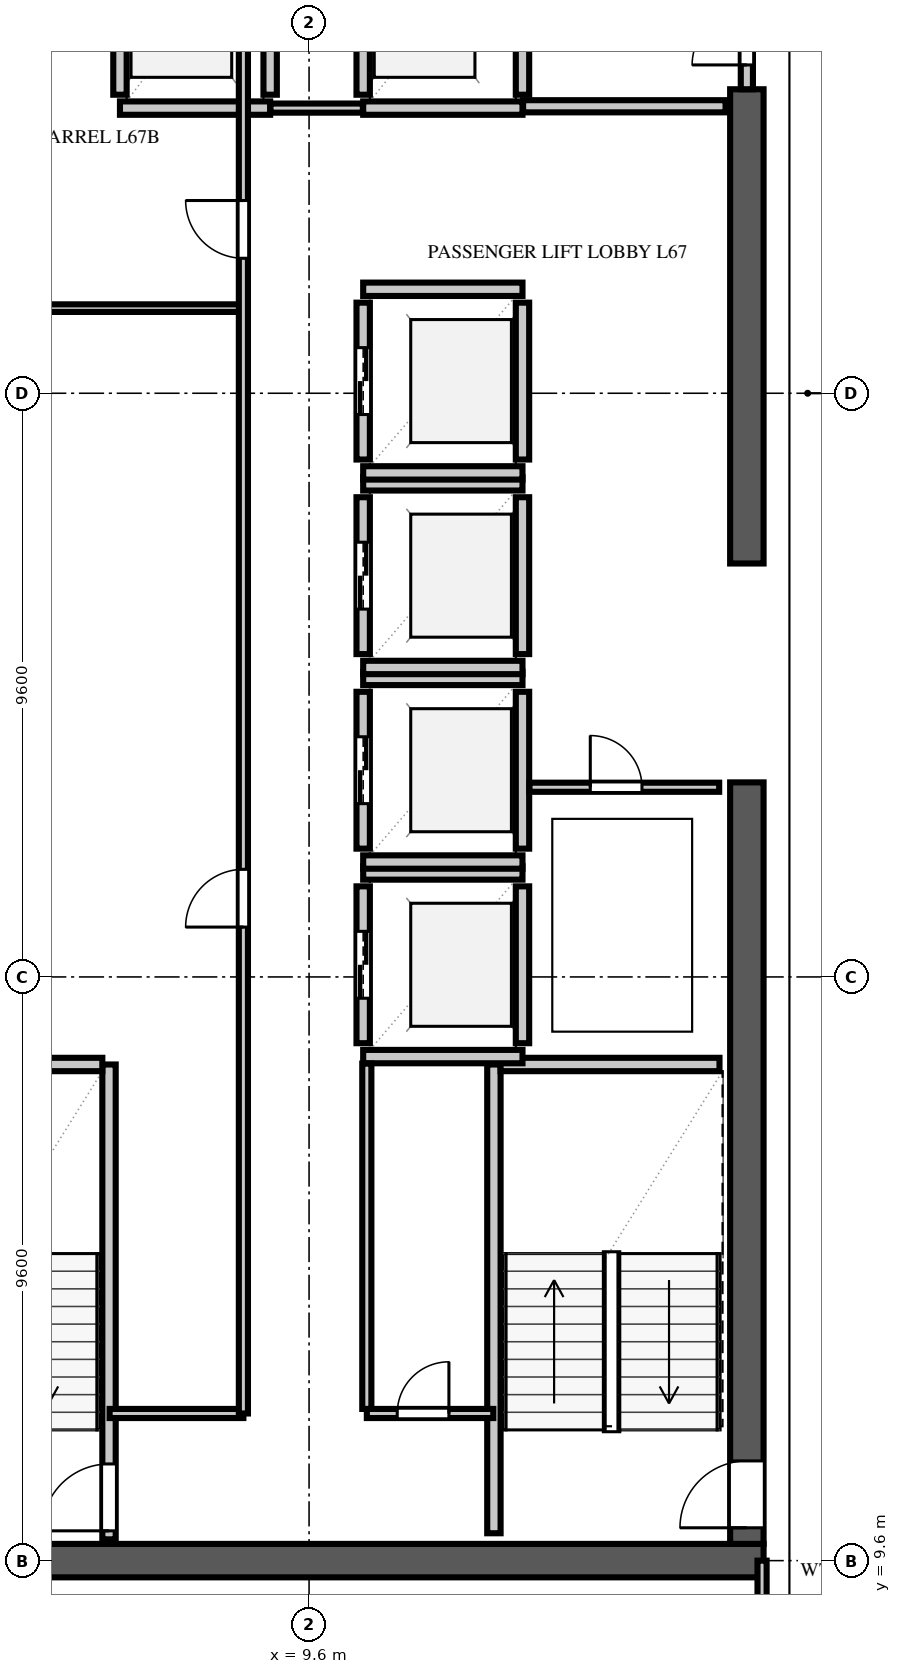
"""IFC4 building model, lengths in metres.
Left out: names, types, materials, properties, quantities, classifications, styles, units other than length and angle.
Written with IfcOpenShell. Run it as: python <this file> out.ifc"""

import sys

from ifc_helpers import new_model, si_unit, direction, frame, frame_2d, origin, place, context, subcontext, project, spatial, rectangle, extrude, element, fill, save


model = new_model("IFC4")
c1 = context("Model", 3, precision=1e-05, world=origin(), true_north=direction((0.0, 1.0)))
c2 = subcontext(c1, "Body", "Model", "MODEL_VIEW")
j1 = project(units=[si_unit("LENGTHUNIT", "METRE"), si_unit("PLANEANGLEUNIT", "RADIAN")], contexts=[c1])
p1 = place(None, origin())
s1 = spatial("IfcSite", under=j1, at=p1, CompositionType="ELEMENT")
p2 = place(p1, origin())
s2 = spatial("IfcBuilding", under=s1, at=p2, CompositionType="ELEMENT")
p3 = place(p2, frame((0.0, 0.0, 265.8)))
s3 = spatial("IfcBuildingStorey", under=s2, at=p3, CompositionType="ELEMENT", Elevation=265.8)
p4 = place(p3, frame((2.475, 9.6, 0.0), z_axis=(0.0, 0.0, 1.0), x_axis=(1.0, 0.0, 0.0)))
e1 = element("IfcWall", 1, at=p4, inside=s3, PredefinedType="SHEAR", context=c2, shape_type="SweptSolid", body=[
    extrude(rectangle(XDim=14.6, YDim=0.55, at=frame_2d((7.3, 0.0))), origin(), (0.0, 0.0, 1.0), 3.54),
])
p5 = place(p3, frame((16.8, 9.875, 0.0), z_axis=(0.0, 0.0, 1.0), x_axis=(0.0, 1.0, 0.0)))
e2 = element("IfcWall", 2, at=p5, inside=s3, PredefinedType="SHEAR", context=c2, shape_type="SweptSolid", body=[
    extrude(rectangle(XDim=12.525, YDim=0.55, at=frame_2d((6.262, 0.0))), origin(), (0.0, 0.0, 1.0), 3.54),
])
p6 = place(p5, frame((0.265, 0.0, 0.0)))
e3 = element("IfcOpeningElement", 3, at=p6, cuts=e2, PredefinedType="OPENING", context=c2, shape_type="SweptSolid", body=[
    extrude(rectangle(XDim=1.1, YDim=2.2, at=frame_2d((0.55, 1.1))), frame((0.0, 0.287, 0.0), z_axis=(0.0, -1.0, 0.0), x_axis=(1.0, 0.0, 0.0)), (0.0, 0.0, 1.0), 0.574),
])
p7 = place(p3, frame((16.8, 26.0, 0.0), z_axis=(0.0, 0.0, 1.0), x_axis=(0.0, 1.0, 0.0)))
e4 = element("IfcWall", 4, at=p7, inside=s3, PredefinedType="SHEAR", context=c2, shape_type="SweptSolid", body=[
    extrude(rectangle(XDim=7.8, YDim=0.55, at=frame_2d((3.9, 0.0))), origin(), (0.0, 0.0, 1.0), 3.54),
])
p8 = place(p3, frame((6.31, 9.95, 0.0), z_axis=(0.0, 0.0, 1.0), x_axis=(0.0, 1.0, 0.0)))
e5 = element("IfcWall", 5, at=p8, inside=s3, PredefinedType="SOLIDWALL", context=c2, shape_type="SweptSolid", body=[
    extrude(rectangle(XDim=7.81, YDim=0.22, at=frame_2d((3.905, 0.0))), origin(), (0.0, 0.0, 1.0), 3.54),
])
p9 = place(p8, frame((0.14, 0.0, 0.0)))
e6 = element("IfcOpeningElement", 6, at=p9, cuts=e5, PredefinedType="OPENING", context=c2, shape_type="SweptSolid", body=[
    extrude(rectangle(XDim=1.1, YDim=2.2, at=frame_2d((0.55, 1.1))), frame((0.0, 0.122, 0.0), z_axis=(0.0, -1.0, 0.0), x_axis=(1.0, 0.0, 0.0)), (0.0, 0.0, 1.0), 0.244),
])
p10 = place(p3, frame((2.65, 17.76, 0.0), z_axis=(0.0, 0.0, 1.0), x_axis=(1.0, 0.0, 0.0)))
e7 = element("IfcWall", 7, at=p10, inside=s3, PredefinedType="SOLIDWALL", context=c2, shape_type="SweptSolid", body=[
    extrude(rectangle(XDim=3.55, YDim=0.22, at=frame_2d((1.775, 0.0))), origin(), (0.0, 0.0, 1.0), 3.54),
])
p11 = place(p3, frame((12.64, 10.05, 0.0), z_axis=(0.0, 0.0, 1.0), x_axis=(0.0, 1.0, 0.0)))
e8 = element("IfcWall", 8, at=p11, inside=s3, PredefinedType="SOLIDWALL", context=c2, shape_type="SweptSolid", body=[
    extrude(rectangle(XDim=7.71, YDim=0.22, at=frame_2d((3.855, 0.0))), origin(), (0.0, 0.0, 1.0), 3.54),
])
p12 = place(p3, frame((12.75, 17.76, 0.0), z_axis=(0.0, 0.0, 1.0), x_axis=(1.0, 0.0, 0.0)))
e9 = element("IfcWall", 9, at=p12, inside=s3, PredefinedType="SOLIDWALL", context=c2, shape_type="SweptSolid", body=[
    extrude(rectangle(XDim=3.6, YDim=0.22, at=frame_2d((1.8, 0.0))), origin(), (0.0, 0.0, 1.0), 3.54),
])
p13 = place(p3, frame((10.49, 18.11, 0.0), z_axis=(0.0, 0.0, 1.0), x_axis=(0.0, 1.0, 0.0)))
e10 = element("IfcWall", 10, at=p13, inside=s3, PredefinedType="SOLIDWALL", context=c2, shape_type="SweptSolid", body=[
    extrude(rectangle(XDim=2.58, YDim=0.22, at=frame_2d((1.29, 0.0))), origin(), (0.0, 0.0, 1.0), 3.54),
])
p14 = place(p13, frame((0.74, 0.0, 0.0)))
e11 = element("IfcOpeningElement", 11, at=p14, cuts=e10, PredefinedType="OPENING", context=c2, shape_type="SweptSolid", body=[
    extrude(rectangle(XDim=1.1, YDim=2.2, at=frame_2d((0.55, 1.1))), frame((0.0, 0.122, 0.0), z_axis=(0.0, -1.0, 0.0), x_axis=(1.0, 0.0, 0.0)), (0.0, 0.0, 1.0), 0.244),
])
p15 = place(p3, frame((13.11, 18.11, 0.0), z_axis=(0.0, 0.0, 1.0), x_axis=(0.0, 1.0, 0.0)))
e12 = element("IfcWall", 12, at=p15, inside=s3, PredefinedType="SOLIDWALL", context=c2, shape_type="SweptSolid", body=[
    extrude(rectangle(XDim=2.58, YDim=0.22, at=frame_2d((1.29, 0.0))), origin(), (0.0, 0.0, 1.0), 3.54),
])
for number, where, z_axis, x_axis in (
    (13, (10.49, 17.89, 0.0), (0.0, 0.0, 1.0), (1.0, 0.0, 0.0)),
    (14, (10.49, 20.91, 0.0), (0.0, 0.0, 1.0), (1.0, 0.0, 0.0)),
):
    element("IfcWall", number, at=place(p3, frame(where, z_axis=z_axis, x_axis=x_axis)), inside=s3, PredefinedType="SOLIDWALL", context=c2, shape_type="SweptSolid", body=[
        extrude(rectangle(XDim=2.62, YDim=0.22, at=frame_2d((1.31, 0.0))), origin(), (0.0, 0.0, 1.0), 3.54),
    ])
p16 = place(p3, frame((10.49, 21.31, 0.0), z_axis=(0.0, 0.0, 1.0), x_axis=(0.0, 1.0, 0.0)))
e15 = element("IfcWall", 15, at=p16, inside=s3, PredefinedType="SOLIDWALL", context=c2, shape_type="SweptSolid", body=[
    extrude(rectangle(XDim=2.58, YDim=0.22, at=frame_2d((1.29, 0.0))), origin(), (0.0, 0.0, 1.0), 3.54),
])
p17 = place(p16, frame((0.74, 0.0, 0.0)))
e16 = element("IfcOpeningElement", 16, at=p17, cuts=e15, PredefinedType="OPENING", context=c2, shape_type="SweptSolid", body=[
    extrude(rectangle(XDim=1.1, YDim=2.2, at=frame_2d((0.55, 1.1))), frame((0.0, 0.122, 0.0), z_axis=(0.0, -1.0, 0.0), x_axis=(1.0, 0.0, 0.0)), (0.0, 0.0, 1.0), 0.244),
])
p18 = place(p3, frame((13.11, 21.31, 0.0), z_axis=(0.0, 0.0, 1.0), x_axis=(0.0, 1.0, 0.0)))
e17 = element("IfcWall", 17, at=p18, inside=s3, PredefinedType="SOLIDWALL", context=c2, shape_type="SweptSolid", body=[
    extrude(rectangle(XDim=2.58, YDim=0.22, at=frame_2d((1.29, 0.0))), origin(), (0.0, 0.0, 1.0), 3.54),
])
for number, where, z_axis, x_axis in (
    (18, (10.49, 21.09, 0.0), (0.0, 0.0, 1.0), (1.0, 0.0, 0.0)),
    (19, (10.49, 24.11, 0.0), (0.0, 0.0, 1.0), (1.0, 0.0, 0.0)),
):
    element("IfcWall", number, at=place(p3, frame(where, z_axis=z_axis, x_axis=x_axis)), inside=s3, PredefinedType="SOLIDWALL", context=c2, shape_type="SweptSolid", body=[
        extrude(rectangle(XDim=2.62, YDim=0.22, at=frame_2d((1.31, 0.0))), origin(), (0.0, 0.0, 1.0), 3.54),
    ])
p19 = place(p3, frame((10.49, 24.51, 0.0), z_axis=(0.0, 0.0, 1.0), x_axis=(0.0, 1.0, 0.0)))
e20 = element("IfcWall", 20, at=p19, inside=s3, PredefinedType="SOLIDWALL", context=c2, shape_type="SweptSolid", body=[
    extrude(rectangle(XDim=2.58, YDim=0.22, at=frame_2d((1.29, 0.0))), origin(), (0.0, 0.0, 1.0), 3.54),
])
p20 = place(p19, frame((0.74, 0.0, 0.0)))
e21 = element("IfcOpeningElement", 21, at=p20, cuts=e20, PredefinedType="OPENING", context=c2, shape_type="SweptSolid", body=[
    extrude(rectangle(XDim=1.1, YDim=2.2, at=frame_2d((0.55, 1.1))), frame((0.0, 0.122, 0.0), z_axis=(0.0, -1.0, 0.0), x_axis=(1.0, 0.0, 0.0)), (0.0, 0.0, 1.0), 0.244),
])
p21 = place(p3, frame((13.11, 24.51, 0.0), z_axis=(0.0, 0.0, 1.0), x_axis=(0.0, 1.0, 0.0)))
e22 = element("IfcWall", 22, at=p21, inside=s3, PredefinedType="SOLIDWALL", context=c2, shape_type="SweptSolid", body=[
    extrude(rectangle(XDim=2.58, YDim=0.22, at=frame_2d((1.29, 0.0))), origin(), (0.0, 0.0, 1.0), 3.54),
])
for number, where, z_axis, x_axis in (
    (23, (10.49, 24.29, 0.0), (0.0, 0.0, 1.0), (1.0, 0.0, 0.0)),
    (24, (10.49, 27.31, 0.0), (0.0, 0.0, 1.0), (1.0, 0.0, 0.0)),
):
    element("IfcWall", number, at=place(p3, frame(where, z_axis=z_axis, x_axis=x_axis)), inside=s3, PredefinedType="SOLIDWALL", context=c2, shape_type="SweptSolid", body=[
        extrude(rectangle(XDim=2.62, YDim=0.22, at=frame_2d((1.31, 0.0))), origin(), (0.0, 0.0, 1.0), 3.54),
    ])
p22 = place(p3, frame((10.49, 27.71, 0.0), z_axis=(0.0, 0.0, 1.0), x_axis=(0.0, 1.0, 0.0)))
e25 = element("IfcWall", 25, at=p22, inside=s3, PredefinedType="SOLIDWALL", context=c2, shape_type="SweptSolid", body=[
    extrude(rectangle(XDim=2.58, YDim=0.22, at=frame_2d((1.29, 0.0))), origin(), (0.0, 0.0, 1.0), 3.54),
])
p23 = place(p22, frame((0.74, 0.0, 0.0)))
e26 = element("IfcOpeningElement", 26, at=p23, cuts=e25, PredefinedType="OPENING", context=c2, shape_type="SweptSolid", body=[
    extrude(rectangle(XDim=1.1, YDim=2.2, at=frame_2d((0.55, 1.1))), frame((0.0, 0.122, 0.0), z_axis=(0.0, -1.0, 0.0), x_axis=(1.0, 0.0, 0.0)), (0.0, 0.0, 1.0), 0.244),
])
p24 = place(p3, frame((13.11, 27.71, 0.0), z_axis=(0.0, 0.0, 1.0), x_axis=(0.0, 1.0, 0.0)))
e27 = element("IfcWall", 27, at=p24, inside=s3, PredefinedType="SOLIDWALL", context=c2, shape_type="SweptSolid", body=[
    extrude(rectangle(XDim=2.58, YDim=0.22, at=frame_2d((1.29, 0.0))), origin(), (0.0, 0.0, 1.0), 3.54),
])
for number, where, z_axis, x_axis in (
    (28, (10.49, 27.49, 0.0), (0.0, 0.0, 1.0), (1.0, 0.0, 0.0)),
    (29, (10.49, 30.51, 0.0), (0.0, 0.0, 1.0), (1.0, 0.0, 0.0)),
):
    element("IfcWall", number, at=place(p3, frame(where, z_axis=z_axis, x_axis=x_axis)), inside=s3, PredefinedType="SOLIDWALL", context=c2, shape_type="SweptSolid", body=[
        extrude(rectangle(XDim=2.62, YDim=0.22, at=frame_2d((1.31, 0.0))), origin(), (0.0, 0.0, 1.0), 3.54),
    ])
for number, where, z_axis, x_axis in (
    (30, (6.49, 33.71, 0.0), (0.0, 0.0, 1.0), (0.0, 1.0, 0.0)),
    (31, (8.96, 33.71, 0.0), (0.0, 0.0, 1.0), (0.0, 1.0, 0.0)),
):
    element("IfcWall", number, at=place(p3, frame(where, z_axis=z_axis, x_axis=x_axis)), inside=s3, PredefinedType="SOLIDWALL", context=c2, shape_type="SweptSolid", body=[
        extrude(rectangle(XDim=2.78, YDim=0.22, at=frame_2d((1.39, 0.0))), origin(), (0.0, 0.0, 1.0), 3.54),
    ])
p25 = place(p3, frame((6.49, 33.49, 0.0), z_axis=(0.0, 0.0, 1.0), x_axis=(1.0, 0.0, 0.0)))
e32 = element("IfcWall", 32, at=p25, inside=s3, PredefinedType="SOLIDWALL", context=c2, shape_type="SweptSolid", body=[
    extrude(rectangle(XDim=2.47, YDim=0.22, at=frame_2d((1.235, 0.0))), origin(), (0.0, 0.0, 1.0), 3.54),
])
for number, where, z_axis, x_axis in (
    (33, (10.49, 33.71, 0.0), (0.0, 0.0, 1.0), (0.0, 1.0, 0.0)),
    (34, (13.11, 33.71, 0.0), (0.0, 0.0, 1.0), (0.0, 1.0, 0.0)),
):
    element("IfcWall", number, at=place(p3, frame(where, z_axis=z_axis, x_axis=x_axis)), inside=s3, PredefinedType="SOLIDWALL", context=c2, shape_type="SweptSolid", body=[
        extrude(rectangle(XDim=2.78, YDim=0.22, at=frame_2d((1.39, 0.0))), origin(), (0.0, 0.0, 1.0), 3.54),
    ])
p26 = place(p3, frame((10.49, 33.49, 0.0), z_axis=(0.0, 0.0, 1.0), x_axis=(1.0, 0.0, 0.0)))
e35 = element("IfcWall", 35, at=p26, inside=s3, PredefinedType="SOLIDWALL", context=c2, shape_type="SweptSolid", body=[
    extrude(rectangle(XDim=2.62, YDim=0.22, at=frame_2d((1.31, 0.0))), origin(), (0.0, 0.0, 1.0), 3.54),
])
p27 = place(p3, frame((13.12, 33.52, 0.0), z_axis=(0.0, 0.0, 1.0), x_axis=(1.0, 0.0, 0.0)))
e36 = element("IfcWall", 36, at=p27, inside=s3, PredefinedType="SOLIDWALL", context=c2, shape_type="SweptSolid", body=[
    extrude(rectangle(XDim=3.33, YDim=0.2, at=frame_2d((1.665, 0.0))), origin(), (0.0, 0.0, 1.0), 3.54),
])
p28 = place(p3, frame((16.8, 33.8, 0.0), z_axis=(0.0, 0.0, 1.0), x_axis=(0.0, 1.0, 0.0)))
e37 = element("IfcWall", 37, at=p28, inside=s3, PredefinedType="SOLIDWALL", context=c2, shape_type="SweptSolid", body=[
    extrude(rectangle(XDim=2.6, YDim=0.2, at=frame_2d((1.3, 0.0))), origin(), (0.0, 0.0, 1.0), 3.54),
])
p29 = place(p28, frame((0.4, 0.0, 0.0)))
e38 = element("IfcOpeningElement", 38, at=p29, cuts=e37, PredefinedType="OPENING", context=c2, shape_type="SweptSolid", body=[
    extrude(rectangle(XDim=1.8, YDim=2.2, at=frame_2d((0.9, 1.1))), frame((0.0, 0.112, 0.0), z_axis=(0.0, -1.0, 0.0), x_axis=(1.0, 0.0, 0.0)), (0.0, 0.0, 1.0), 0.224),
])
p30 = place(p3, frame((8.965, 33.49, 0.0), z_axis=(0.0, 0.0, 1.0), x_axis=(1.0, 0.0, 0.0)))
e39 = element("IfcWall", 39, at=p30, inside=s3, PredefinedType="PARTITIONING", context=c2, shape_type="SweptSolid", body=[
    extrude(rectangle(XDim=1.52, YDim=0.15, at=frame_2d((0.76, 0.0))), origin(), (0.0, 0.0, 1.0), 3.54),
])
p31 = place(p3, frame((10.55, 12.02, 0.0), z_axis=(0.0, 0.0, 1.0), x_axis=(1.0, 0.0, 0.0)))
e40 = element("IfcWall", 40, at=p31, inside=s3, PredefinedType="PARTITIONING", context=c2, shape_type="SweptSolid", body=[
    extrude(rectangle(XDim=2.08, YDim=0.15, at=frame_2d((1.04, 0.0))), origin(), (0.0, 0.0, 1.0), 3.54),
])
p32 = place(p31, frame((0.5, 0.0, 0.0)))
e41 = element("IfcOpeningElement", 41, at=p32, cuts=e40, PredefinedType="OPENING", context=c2, shape_type="SweptSolid", body=[
    extrude(rectangle(XDim=0.85, YDim=2.1, at=frame_2d((0.425, 1.05))), frame((0.0, 0.087, 0.0), z_axis=(0.0, -1.0, 0.0), x_axis=(1.0, 0.0, 0.0)), (0.0, 0.0, 1.0), 0.174),
])
p33 = place(p3, frame((10.55, 12.095, 0.0), z_axis=(0.0, 0.0, 1.0), x_axis=(0.0, 1.0, 0.0)))
e42 = element("IfcWall", 42, at=p33, inside=s3, PredefinedType="PARTITIONING", context=c2, shape_type="SweptSolid", body=[
    extrude(rectangle(XDim=5.68, YDim=0.15, at=frame_2d((2.84, 0.0))), origin(), (0.0, 0.0, 1.0), 3.54),
])
p34 = place(p3, frame((13.225, 22.32, 0.0), z_axis=(0.0, 0.0, 1.0), x_axis=(1.0, 0.0, 0.0)))
e43 = element("IfcWall", 43, at=p34, inside=s3, PredefinedType="PARTITIONING", context=c2, shape_type="SweptSolid", body=[
    extrude(rectangle(XDim=3.12, YDim=0.15, at=frame_2d((1.56, 0.0))), origin(), (0.0, 0.0, 1.0), 3.54),
])
p35 = place(p34, frame((1.0, 0.0, 0.0)))
e44 = element("IfcOpeningElement", 44, at=p35, cuts=e43, PredefinedType="OPENING", context=c2, shape_type="SweptSolid", body=[
    extrude(rectangle(XDim=0.85, YDim=2.1, at=frame_2d((0.425, 1.05))), frame((0.0, 0.087, 0.0), z_axis=(0.0, -1.0, 0.0), x_axis=(1.0, 0.0, 0.0)), (0.0, 0.0, 1.0), 0.174),
])
p36 = place(p3, frame((6.32, 12.02, 0.0), z_axis=(0.0, 0.0, 1.0), x_axis=(1.0, 0.0, 0.0)))
e45 = element("IfcWall", 45, at=p36, inside=s3, PredefinedType="PARTITIONING", context=c2, shape_type="SweptSolid", body=[
    extrude(rectangle(XDim=2.2, YDim=0.15, at=frame_2d((1.1, 0.0))), origin(), (0.0, 0.0, 1.0), 3.54),
])
p37 = place(p3, frame((2.65, 30.2, 0.0), z_axis=(0.0, 0.0, 1.0), x_axis=(1.0, 0.0, 0.0)))
e46 = element("IfcWall", 46, at=p37, inside=s3, PredefinedType="PARTITIONING", context=c2, shape_type="SweptSolid", body=[
    extrude(rectangle(XDim=5.87, YDim=0.125, at=frame_2d((2.935, 0.0))), origin(), (0.0, 0.0, 1.0), 3.54),
])
p38 = place(p3, frame((8.52, 12.02, 0.0), z_axis=(0.0, 0.0, 1.0), x_axis=(0.0, 1.0, 0.0)))
e47 = element("IfcWall", 47, at=p38, inside=s3, PredefinedType="PARTITIONING", context=c2, shape_type="SweptSolid", body=[
    extrude(rectangle(XDim=24.76, YDim=0.15, at=frame_2d((12.38, 0.0))), origin(), (0.0, 0.0, 1.0), 3.54),
])
p39 = place(p38, frame((8.0, 0.0, 0.0)))
e48 = element("IfcOpeningElement", 48, at=p39, cuts=e47, PredefinedType="OPENING", context=c2, shape_type="SweptSolid", body=[
    extrude(rectangle(XDim=0.95, YDim=2.15, at=frame_2d((0.475, 1.075))), frame((0.0, 0.087, 0.0), z_axis=(0.0, -1.0, 0.0), x_axis=(1.0, 0.0, 0.0)), (0.0, 0.0, 1.0), 0.174),
])
p40 = place(p38, frame((19.0, 0.0, 0.0)))
e49 = element("IfcOpeningElement", 49, at=p40, cuts=e47, PredefinedType="OPENING", context=c2, shape_type="SweptSolid", body=[
    extrude(rectangle(XDim=0.95, YDim=2.15, at=frame_2d((0.475, 1.075))), frame((0.0, 0.087, 0.0), z_axis=(0.0, -1.0, 0.0), x_axis=(1.0, 0.0, 0.0)), (0.0, 0.0, 1.0), 0.174),
])
p41 = place(p3, frame((17.05, 0.22, 0.0), z_axis=(0.0, 0.0, 1.0), x_axis=(0.0, 1.0, 0.0)))
e50 = element("IfcWall", 50, at=p41, inside=s3, PredefinedType="PARTITIONING", context=c2, shape_type="SweptSolid", body=[
    extrude(rectangle(XDim=9.38, YDim=0.15, at=frame_2d((4.69, 0.0))), origin(), (0.0, 0.0, 1.0), 3.54),
])
p42 = place(p41, frame((5.58, 0.0, 0.0)))
e51 = element("IfcOpeningElement", 51, at=p42, cuts=e50, PredefinedType="OPENING", context=c2, shape_type="SweptSolid", body=[
    extrude(rectangle(XDim=2.0, YDim=2.3, at=frame_2d((1.0, 1.15))), frame((0.0, 0.087, 0.0), z_axis=(0.0, -1.0, 0.0), x_axis=(1.0, 0.0, 0.0)), (0.0, 0.0, 1.0), 0.174),
])
p43 = place(p9, origin())
e52 = element("IfcDoor", 52, at=p43, inside=s3, OperationType="SINGLE_SWING_LEFT", PredefinedType="DOOR", context=c2, shape_type="SweptSolid", body=[
    extrude(rectangle(XDim=1.1, YDim=2.2, at=frame_2d((0.55, 1.1))), frame((0.0, 0.025, 0.0), z_axis=(0.0, -1.0, 0.0), x_axis=(1.0, 0.0, 0.0)), (0.0, 0.0, 1.0), 0.05),
])
fill(e6, e52)
p44 = place(p6, origin())
e53 = element("IfcDoor", 53, at=p44, inside=s3, OperationType="SINGLE_SWING_LEFT", PredefinedType="DOOR", context=c2, shape_type="SweptSolid", body=[
    extrude(rectangle(XDim=1.1, YDim=2.2, at=frame_2d((0.55, 1.1))), frame((0.0, 0.025, 0.0), z_axis=(0.0, -1.0, 0.0), x_axis=(1.0, 0.0, 0.0)), (0.0, 0.0, 1.0), 0.05),
])
fill(e3, e53)
p45 = place(p14, origin())
e54 = element("IfcDoor", 54, at=p45, inside=s3, OperationType="DOUBLE_DOOR_SLIDING", PredefinedType="DOOR", context=c2, shape_type="SweptSolid", body=[
    extrude(rectangle(XDim=1.1, YDim=2.2, at=frame_2d((0.55, 1.1))), frame((0.0, 0.025, 0.0), z_axis=(0.0, -1.0, 0.0), x_axis=(1.0, 0.0, 0.0)), (0.0, 0.0, 1.0), 0.05),
])
fill(e11, e54)
p46 = place(p17, origin())
e55 = element("IfcDoor", 55, at=p46, inside=s3, OperationType="DOUBLE_DOOR_SLIDING", PredefinedType="DOOR", context=c2, shape_type="SweptSolid", body=[
    extrude(rectangle(XDim=1.1, YDim=2.2, at=frame_2d((0.55, 1.1))), frame((0.0, 0.025, 0.0), z_axis=(0.0, -1.0, 0.0), x_axis=(1.0, 0.0, 0.0)), (0.0, 0.0, 1.0), 0.05),
])
fill(e16, e55)
p47 = place(p20, origin())
e56 = element("IfcDoor", 56, at=p47, inside=s3, OperationType="DOUBLE_DOOR_SLIDING", PredefinedType="DOOR", context=c2, shape_type="SweptSolid", body=[
    extrude(rectangle(XDim=1.1, YDim=2.2, at=frame_2d((0.55, 1.1))), frame((0.0, 0.025, 0.0), z_axis=(0.0, -1.0, 0.0), x_axis=(1.0, 0.0, 0.0)), (0.0, 0.0, 1.0), 0.05),
])
fill(e21, e56)
p48 = place(p23, origin())
e57 = element("IfcDoor", 57, at=p48, inside=s3, OperationType="DOUBLE_DOOR_SLIDING", PredefinedType="DOOR", context=c2, shape_type="SweptSolid", body=[
    extrude(rectangle(XDim=1.1, YDim=2.2, at=frame_2d((0.55, 1.1))), frame((0.0, 0.025, 0.0), z_axis=(0.0, -1.0, 0.0), x_axis=(1.0, 0.0, 0.0)), (0.0, 0.0, 1.0), 0.05),
])
fill(e26, e57)
p49 = place(p29, origin())
e58 = element("IfcDoor", 58, at=p49, inside=s3, OperationType="DOUBLE_DOOR_SINGLE_SWING", PredefinedType="DOOR", context=c2, shape_type="SweptSolid", body=[
    extrude(rectangle(XDim=1.8, YDim=2.2, at=frame_2d((0.9, 1.1))), frame((0.0, 0.025, 0.0), z_axis=(0.0, -1.0, 0.0), x_axis=(1.0, 0.0, 0.0)), (0.0, 0.0, 1.0), 0.05),
])
fill(e38, e58)
p50 = place(p32, origin())
e59 = element("IfcDoor", 59, at=p50, inside=s3, OperationType="SINGLE_SWING_RIGHT", PredefinedType="DOOR", context=c2, shape_type="SweptSolid", body=[
    extrude(rectangle(XDim=0.85, YDim=2.1, at=frame_2d((0.425, 1.05))), frame((0.0, 0.025, 0.0), z_axis=(0.0, -1.0, 0.0), x_axis=(1.0, 0.0, 0.0)), (0.0, 0.0, 1.0), 0.05),
])
fill(e41, e59)
p51 = place(p35, origin())
e60 = element("IfcDoor", 60, at=p51, inside=s3, OperationType="SINGLE_SWING_LEFT", PredefinedType="DOOR", context=c2, shape_type="SweptSolid", body=[
    extrude(rectangle(XDim=0.85, YDim=2.1, at=frame_2d((0.425, 1.05))), frame((0.0, 0.025, 0.0), z_axis=(0.0, -1.0, 0.0), x_axis=(1.0, 0.0, 0.0)), (0.0, 0.0, 1.0), 0.05),
])
fill(e44, e60)
p52 = place(p39, origin())
e61 = element("IfcDoor", 61, at=p52, inside=s3, OperationType="SINGLE_SWING_LEFT", PredefinedType="DOOR", context=c2, shape_type="SweptSolid", body=[
    extrude(rectangle(XDim=0.95, YDim=2.15, at=frame_2d((0.475, 1.075))), frame((0.0, 0.025, 0.0), z_axis=(0.0, -1.0, 0.0), x_axis=(1.0, 0.0, 0.0)), (0.0, 0.0, 1.0), 0.05),
])
fill(e48, e61)
p53 = place(p40, origin())
e62 = element("IfcDoor", 62, at=p53, inside=s3, OperationType="SINGLE_SWING_RIGHT", PredefinedType="DOOR", context=c2, shape_type="SweptSolid", body=[
    extrude(rectangle(XDim=0.95, YDim=2.15, at=frame_2d((0.475, 1.075))), frame((0.0, 0.025, 0.0), z_axis=(0.0, -1.0, 0.0), x_axis=(1.0, 0.0, 0.0)), (0.0, 0.0, 1.0), 0.05),
])
fill(e49, e62)
save(model, sys.argv[1])
